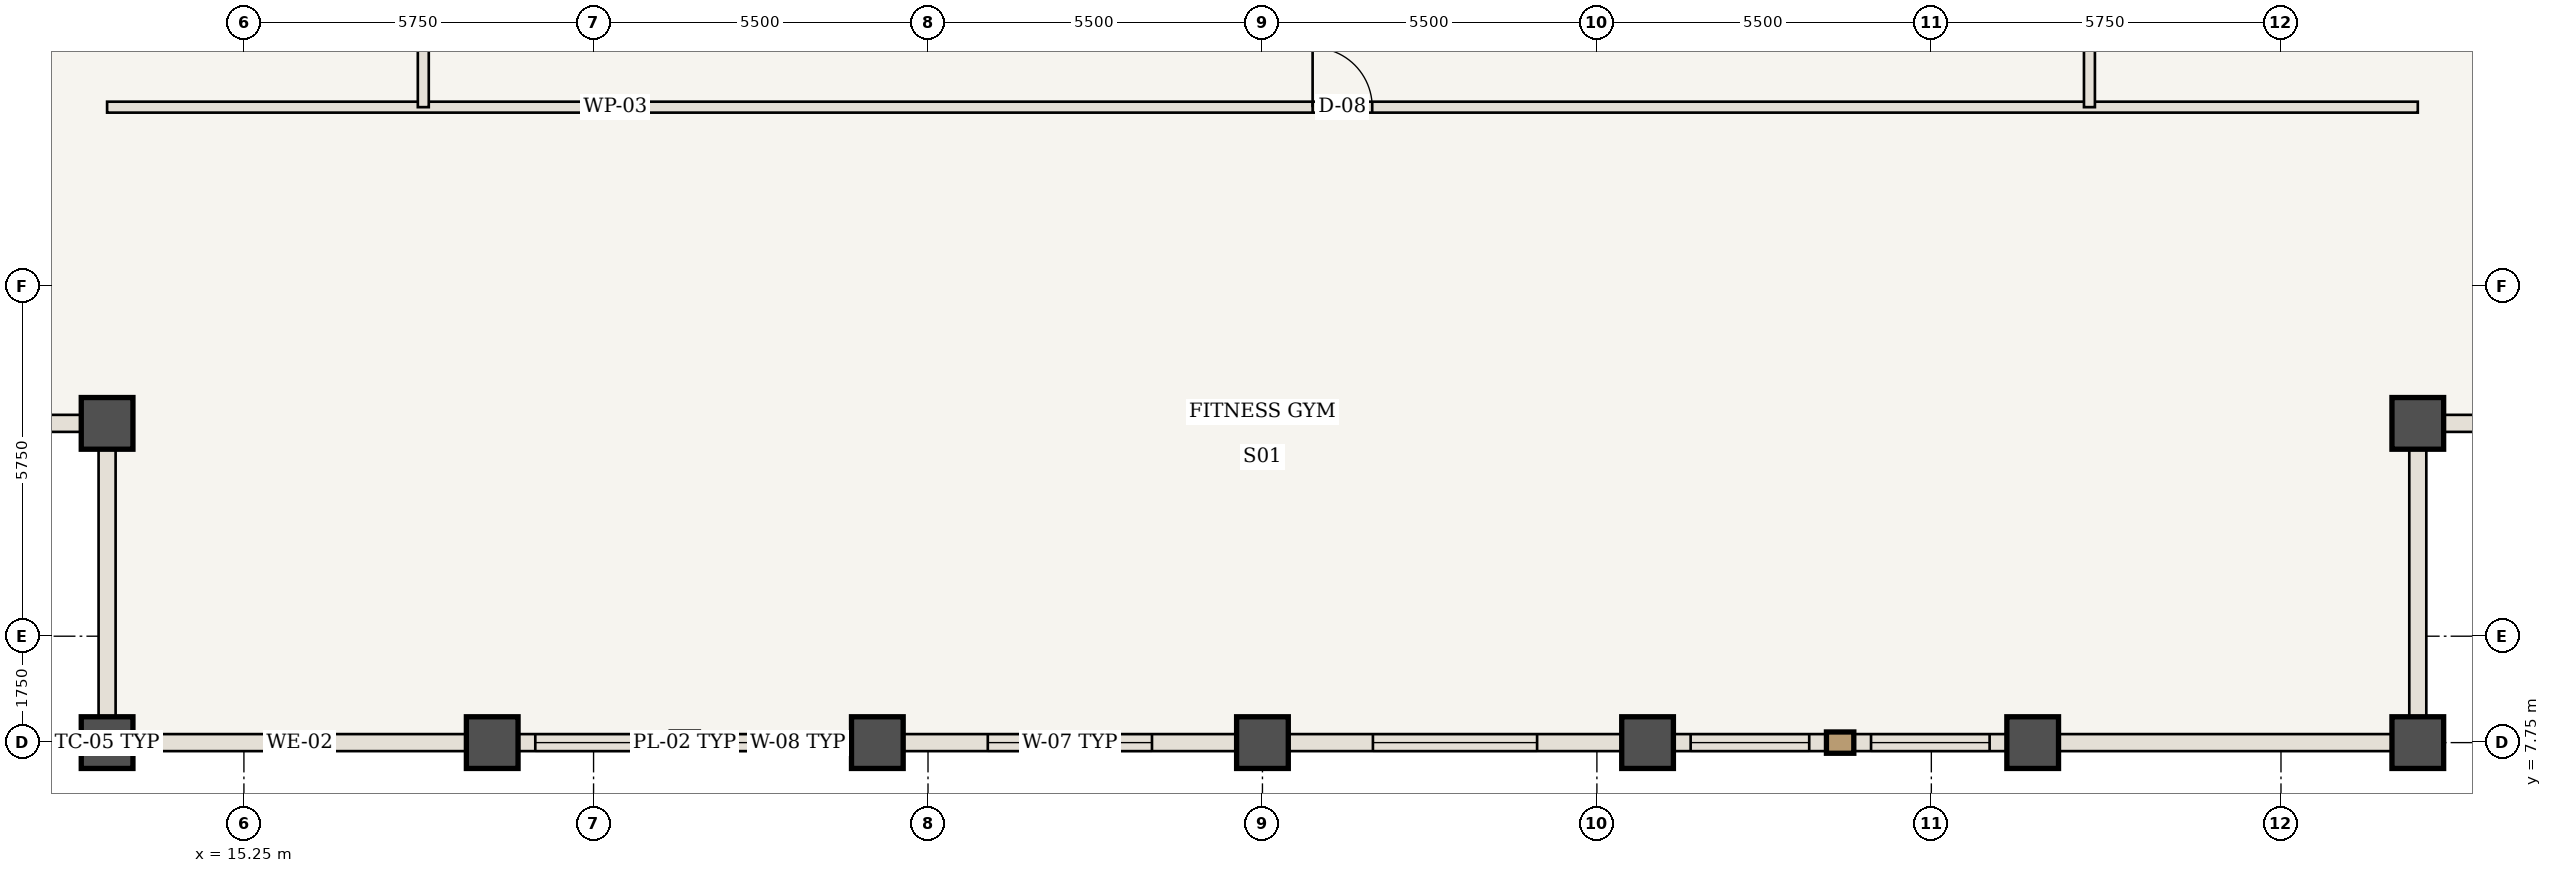
"""IFC4 building model, lengths in metres.
Left out: names, types, materials, properties, quantities, classifications, styles, units other than length and angle.
Written with IfcOpenShell. Run it as: python <this file> out.ifc"""

import sys

from ifc_helpers import new_model, si_unit, direction, frame, frame_2d, origin, origin_2d, place, context, subcontext, project, spatial, rectangle, extrude, element, fill, save


model = new_model("IFC4")
c1 = context("Model", 3, precision=1e-05, world=origin(), true_north=direction((0.0, 1.0)))
c2 = subcontext(c1, "Body", "Model", "MODEL_VIEW")
j1 = project(units=[si_unit("LENGTHUNIT", "METRE"), si_unit("PLANEANGLEUNIT", "RADIAN")], contexts=[c1])
p1 = place(None, origin())
s1 = spatial("IfcSite", under=j1, at=p1, CompositionType="ELEMENT")
p2 = place(p1, origin())
s2 = spatial("IfcBuilding", under=s1, at=p2, CompositionType="ELEMENT")
p3 = place(p2, frame((0.0, 0.0, 244.65)))
s3 = spatial("IfcBuildingStorey", under=s2, at=p3, CompositionType="ELEMENT", Elevation=244.65)
for number, where, z_axis, x_axis in (
    (1, (13.0, 7.75, 0.0), (0.0, 0.0, 1.0), (1.0, 0.0, 0.0)),
    (2, (13.0, 13.0, 0.0), (0.0, 0.0, 1.0), (1.0, 0.0, 0.0)),
    (3, (51.0, 7.75, 0.0), (0.0, 0.0, 1.0), (1.0, 0.0, 0.0)),
    (4, (51.0, 13.0, 0.0), (0.0, 0.0, 1.0), (1.0, 0.0, 0.0)),
    (5, (19.333, 7.75, 0.0), (0.0, 0.0, 1.0), (1.0, 0.0, 0.0)),
    (6, (25.667, 7.75, 0.0), (0.0, 0.0, 1.0), (1.0, 0.0, 0.0)),
    (7, (32.0, 7.75, 0.0), (0.0, 0.0, 1.0), (1.0, 0.0, 0.0)),
    (8, (38.333, 7.75, 0.0), (0.0, 0.0, 1.0), (1.0, 0.0, 0.0)),
    (9, (44.667, 7.75, 0.0), (0.0, 0.0, 1.0), (1.0, 0.0, 0.0)),
):
    element("IfcColumn", number, at=place(p3, frame(where, z_axis=z_axis, x_axis=x_axis)), inside=s3, PredefinedType="COLUMN", context=c2, shape_type="SweptSolid", body=[
        extrude(rectangle(XDim=0.85, YDim=0.85, at=origin_2d()), origin(), (0.0, 0.0, 1.0), 3.85),
    ])
p4 = place(p3, frame((13.0, 18.2, 0.0), z_axis=(0.0, 0.0, 1.0), x_axis=(1.0, 0.0, 0.0)))
e10 = element("IfcWall", 10, at=p4, inside=s3, PredefinedType="STANDARD", context=c2, shape_type="SweptSolid", body=[
    extrude(rectangle(XDim=38.0, YDim=0.18, at=frame_2d((19.0, 0.0))), origin(), (0.0, 0.0, 1.0), 3.685),
])
p5 = place(p4, frame((19.825, 0.0, 0.0)))
e11 = element("IfcOpeningElement", 11, at=p5, cuts=e10, PredefinedType="OPENING", context=c2, shape_type="SweptSolid", body=[
    extrude(rectangle(XDim=0.98, YDim=2.2, at=frame_2d((0.49, 1.1))), frame((0.0, 0.1, 0.0), z_axis=(0.0, -1.0, 0.0), x_axis=(1.0, 0.0, 0.0)), (0.0, 0.0, 1.0), 0.2),
])
p6 = place(p3, frame((18.2, 18.2, 0.0), z_axis=(0.0, 0.0, 1.0), x_axis=(0.0, 1.0, 0.0)))
e12 = element("IfcWall", 12, at=p6, inside=s3, PredefinedType="STANDARD", context=c2, shape_type="SweptSolid", body=[
    extrude(rectangle(XDim=27.6, YDim=0.18, at=frame_2d((13.8, 0.0))), origin(), (0.0, 0.0, 1.0), 3.685),
])
p7 = place(p6, frame((14.75, 0.0, 0.0)))
e13 = element("IfcOpeningElement", 13, at=p7, cuts=e12, PredefinedType="OPENING", context=c2, shape_type="SweptSolid", body=[
    extrude(rectangle(XDim=0.98, YDim=2.2, at=frame_2d((0.49, 1.1))), frame((0.0, 0.1, 0.0), z_axis=(0.0, -1.0, 0.0), x_axis=(1.0, 0.0, 0.0)), (0.0, 0.0, 1.0), 0.2),
])
p8 = place(p3, frame((45.6, 18.2, 0.0), z_axis=(0.0, 0.0, 1.0), x_axis=(0.0, 1.0, 0.0)))
e14 = element("IfcWall", 14, at=p8, inside=s3, PredefinedType="STANDARD", context=c2, shape_type="SweptSolid", body=[
    extrude(rectangle(XDim=12.55, YDim=0.18, at=frame_2d((6.275, 0.0))), origin(), (0.0, 0.0, 1.0), 3.685),
])
p9 = place(p8, frame((5.775, 0.0, 0.0)))
e15 = element("IfcOpeningElement", 15, at=p9, cuts=e14, PredefinedType="OPENING", context=c2, shape_type="SweptSolid", body=[
    extrude(rectangle(XDim=0.98, YDim=2.2, at=frame_2d((0.49, 1.1))), frame((0.0, 0.1, 0.0), z_axis=(0.0, -1.0, 0.0), x_axis=(1.0, 0.0, 0.0)), (0.0, 0.0, 1.0), 0.2),
])
p10 = place(p3, frame((19.333, 7.75, 0.0), z_axis=(0.0, 0.0, 1.0), x_axis=(-1.0, 0.0, 0.0)))
e16 = element("IfcWall", 16, at=p10, inside=s3, PredefinedType="USERDEFINED", context=c2, shape_type="SweptSolid", body=[
    extrude(rectangle(XDim=6.333, YDim=0.28, at=frame_2d((3.167, 0.0))), origin(), (0.0, 0.0, 1.0), 2.985),
])
p11 = place(p3, frame((25.667, 7.75, 0.0), z_axis=(0.0, 0.0, 1.0), x_axis=(-1.0, 0.0, 0.0)))
e17 = element("IfcWall", 17, at=p11, inside=s3, PredefinedType="USERDEFINED", context=c2, shape_type="SweptSolid", body=[
    extrude(rectangle(XDim=6.333, YDim=0.28, at=frame_2d((3.167, 0.0))), origin(), (0.0, 0.0, 1.0), 2.985),
])
p12 = place(p11, frame((0.708, 0.0, 0.85)))
e18 = element("IfcOpeningElement", 18, at=p12, cuts=e17, PredefinedType="OPENING", context=c2, shape_type="SweptSolid", body=[
    extrude(rectangle(XDim=1.95, YDim=1.935, at=frame_2d((0.975, 0.968))), frame((0.0, 0.15, 0.0), z_axis=(0.0, -1.0, 0.0), x_axis=(1.0, 0.0, 0.0)), (0.0, 0.0, 1.0), 0.3),
])
p13 = place(p11, frame((3.675, 0.0, 0.85)))
e19 = element("IfcOpeningElement", 19, at=p13, cuts=e17, PredefinedType="OPENING", context=c2, shape_type="SweptSolid", body=[
    extrude(rectangle(XDim=1.95, YDim=1.935, at=frame_2d((0.975, 0.968))), frame((0.0, 0.15, 0.0), z_axis=(0.0, -1.0, 0.0), x_axis=(1.0, 0.0, 0.0)), (0.0, 0.0, 1.0), 0.3),
])
p14 = place(p3, frame((32.0, 7.75, 0.0), z_axis=(0.0, 0.0, 1.0), x_axis=(-1.0, 0.0, 0.0)))
e20 = element("IfcWall", 20, at=p14, inside=s3, PredefinedType="USERDEFINED", context=c2, shape_type="SweptSolid", body=[
    extrude(rectangle(XDim=6.333, YDim=0.28, at=frame_2d((3.167, 0.0))), origin(), (0.0, 0.0, 1.0), 2.985),
])
p15 = place(p14, frame((1.817, 0.0, 0.85)))
e21 = element("IfcOpeningElement", 21, at=p15, cuts=e20, PredefinedType="OPENING", context=c2, shape_type="SweptSolid", body=[
    extrude(rectangle(XDim=2.7, YDim=1.935, at=frame_2d((1.35, 0.968))), frame((0.0, 0.15, 0.0), z_axis=(0.0, -1.0, 0.0), x_axis=(1.0, 0.0, 0.0)), (0.0, 0.0, 1.0), 0.3),
])
p16 = place(p3, frame((38.333, 7.75, 0.0), z_axis=(0.0, 0.0, 1.0), x_axis=(-1.0, 0.0, 0.0)))
e22 = element("IfcWall", 22, at=p16, inside=s3, PredefinedType="USERDEFINED", context=c2, shape_type="SweptSolid", body=[
    extrude(rectangle(XDim=6.333, YDim=0.28, at=frame_2d((3.167, 0.0))), origin(), (0.0, 0.0, 1.0), 2.985),
])
p17 = place(p16, frame((1.817, 0.0, 0.85)))
e23 = element("IfcOpeningElement", 23, at=p17, cuts=e22, PredefinedType="OPENING", context=c2, shape_type="SweptSolid", body=[
    extrude(rectangle(XDim=2.7, YDim=1.935, at=frame_2d((1.35, 0.968))), frame((0.0, 0.15, 0.0), z_axis=(0.0, -1.0, 0.0), x_axis=(1.0, 0.0, 0.0)), (0.0, 0.0, 1.0), 0.3),
])
p18 = place(p3, frame((44.667, 7.75, 0.0), z_axis=(0.0, 0.0, 1.0), x_axis=(-1.0, 0.0, 0.0)))
e24 = element("IfcWall", 24, at=p18, inside=s3, PredefinedType="USERDEFINED", context=c2, shape_type="SweptSolid", body=[
    extrude(rectangle(XDim=6.333, YDim=0.28, at=frame_2d((3.167, 0.0))), origin(), (0.0, 0.0, 1.0), 2.985),
])
p19 = place(p18, frame((0.708, 0.0, 0.85)))
e25 = element("IfcOpeningElement", 25, at=p19, cuts=e24, PredefinedType="OPENING", context=c2, shape_type="SweptSolid", body=[
    extrude(rectangle(XDim=1.95, YDim=1.935, at=frame_2d((0.975, 0.968))), frame((0.0, 0.15, 0.0), z_axis=(0.0, -1.0, 0.0), x_axis=(1.0, 0.0, 0.0)), (0.0, 0.0, 1.0), 0.3),
])
p20 = place(p18, frame((3.675, 0.0, 0.85)))
e26 = element("IfcOpeningElement", 26, at=p20, cuts=e24, PredefinedType="OPENING", context=c2, shape_type="SweptSolid", body=[
    extrude(rectangle(XDim=1.95, YDim=1.935, at=frame_2d((0.975, 0.968))), frame((0.0, 0.15, 0.0), z_axis=(0.0, -1.0, 0.0), x_axis=(1.0, 0.0, 0.0)), (0.0, 0.0, 1.0), 0.3),
])
p21 = place(p3, frame((51.0, 7.75, 0.0), z_axis=(0.0, 0.0, 1.0), x_axis=(-1.0, 0.0, 0.0)))
e27 = element("IfcWall", 27, at=p21, inside=s3, PredefinedType="USERDEFINED", context=c2, shape_type="SweptSolid", body=[
    extrude(rectangle(XDim=6.333, YDim=0.28, at=frame_2d((3.167, 0.0))), origin(), (0.0, 0.0, 1.0), 2.985),
])
for number, where, z_axis, x_axis in (
    (28, (13.0, 7.75, 0.0), (0.0, 0.0, 1.0), (0.0, 1.0, 0.0)),
    (29, (13.0, 13.0, 0.0), (0.0, 0.0, 1.0), (-1.0, 0.0, 0.0)),
    (30, (51.0, 13.0, 0.0), (0.0, 0.0, 1.0), (0.0, -1.0, 0.0)),
    (31, (56.25, 13.0, 0.0), (0.0, 0.0, 1.0), (-1.0, 0.0, 0.0)),
):
    element("IfcWall", number, at=place(p3, frame(where, z_axis=z_axis, x_axis=x_axis)), inside=s3, PredefinedType="USERDEFINED", context=c2, shape_type="SweptSolid", body=[
        extrude(rectangle(XDim=5.25, YDim=0.28, at=frame_2d((2.625, 0.0))), origin(), (0.0, 0.0, 1.0), 2.985),
    ])
p22 = place(p5, origin())
e32 = element("IfcDoor", 32, at=p22, inside=s3, OperationType="SINGLE_SWING_LEFT", PredefinedType="DOOR", context=c2, shape_type="SweptSolid", body=[
    extrude(rectangle(XDim=0.98, YDim=2.2, at=frame_2d((0.49, 1.1))), frame((0.0, 0.025, 0.0), z_axis=(0.0, -1.0, 0.0), x_axis=(1.0, 0.0, 0.0)), (0.0, 0.0, 1.0), 0.05),
])
fill(e11, e32)
p23 = place(p12, origin())
e33 = element("IfcWindow", 33, at=p23, inside=s3, PartitioningType="SINGLE_PANEL", PredefinedType="WINDOW", context=c2, shape_type="SweptSolid", body=[
    extrude(rectangle(XDim=1.95, YDim=1.935, at=frame_2d((0.975, 0.968))), frame((0.0, 0.03, 0.0), z_axis=(0.0, -1.0, 0.0), x_axis=(1.0, 0.0, 0.0)), (0.0, 0.0, 1.0), 0.06),
])
fill(e18, e33)
p24 = place(p13, origin())
e34 = element("IfcWindow", 34, at=p24, inside=s3, PartitioningType="SINGLE_PANEL", PredefinedType="WINDOW", context=c2, shape_type="SweptSolid", body=[
    extrude(rectangle(XDim=1.95, YDim=1.935, at=frame_2d((0.975, 0.968))), frame((0.0, 0.03, 0.0), z_axis=(0.0, -1.0, 0.0), x_axis=(1.0, 0.0, 0.0)), (0.0, 0.0, 1.0), 0.06),
])
fill(e19, e34)
p25 = place(p15, origin())
e35 = element("IfcWindow", 35, at=p25, inside=s3, PartitioningType="SINGLE_PANEL", PredefinedType="WINDOW", context=c2, shape_type="SweptSolid", body=[
    extrude(rectangle(XDim=2.7, YDim=1.935, at=frame_2d((1.35, 0.968))), frame((0.0, 0.03, 0.0), z_axis=(0.0, -1.0, 0.0), x_axis=(1.0, 0.0, 0.0)), (0.0, 0.0, 1.0), 0.06),
])
fill(e21, e35)
p26 = place(p17, origin())
e36 = element("IfcWindow", 36, at=p26, inside=s3, PartitioningType="SINGLE_PANEL", PredefinedType="WINDOW", context=c2, shape_type="SweptSolid", body=[
    extrude(rectangle(XDim=2.7, YDim=1.935, at=frame_2d((1.35, 0.968))), frame((0.0, 0.03, 0.0), z_axis=(0.0, -1.0, 0.0), x_axis=(1.0, 0.0, 0.0)), (0.0, 0.0, 1.0), 0.06),
])
fill(e23, e36)
p27 = place(p19, origin())
e37 = element("IfcWindow", 37, at=p27, inside=s3, PartitioningType="SINGLE_PANEL", PredefinedType="WINDOW", context=c2, shape_type="SweptSolid", body=[
    extrude(rectangle(XDim=1.95, YDim=1.935, at=frame_2d((0.975, 0.968))), frame((0.0, 0.03, 0.0), z_axis=(0.0, -1.0, 0.0), x_axis=(1.0, 0.0, 0.0)), (0.0, 0.0, 1.0), 0.06),
])
fill(e25, e37)
p28 = place(p20, origin())
e38 = element("IfcWindow", 38, at=p28, inside=s3, PartitioningType="SINGLE_PANEL", PredefinedType="WINDOW", context=c2, shape_type="SweptSolid", body=[
    extrude(rectangle(XDim=1.95, YDim=1.935, at=frame_2d((0.975, 0.968))), frame((0.0, 0.03, 0.0), z_axis=(0.0, -1.0, 0.0), x_axis=(1.0, 0.0, 0.0)), (0.0, 0.0, 1.0), 0.06),
])
fill(e26, e38)
save(model, sys.argv[1])
